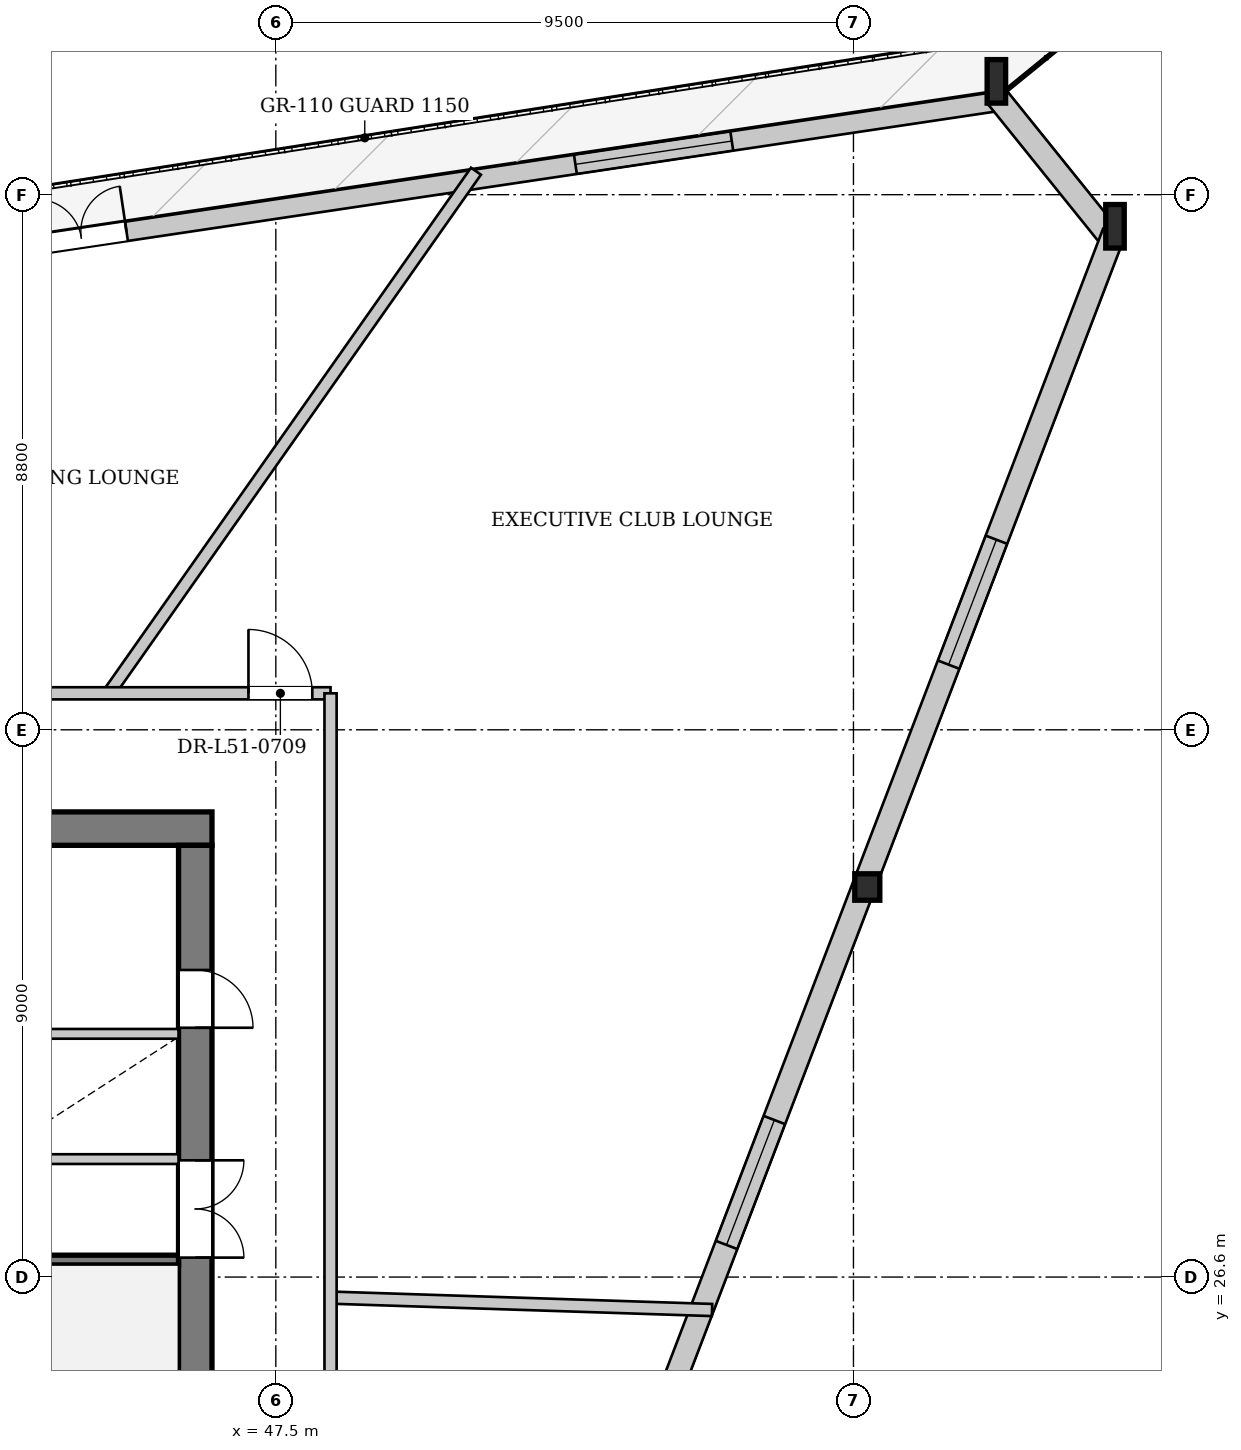
"""IFC4 building model, lengths in metres.
Left out: names, types, materials, properties, quantities, classifications, styles, units other than length and angle.
Written with IfcOpenShell. Run it as: python <this file> out.ifc"""

import sys

from ifc_helpers import new_model, si_unit, direction, frame, frame_2d, origin, origin_2d, place, context, subcontext, project, spatial, rectangle, i_section, extrude, source, transform, mapped, element, fill, save


model = new_model("IFC4")
c1 = context("Model", 3, precision=1e-05, world=origin(), true_north=direction((0.0, 1.0)))
c2 = subcontext(c1, "Body", "Model", "MODEL_VIEW")
j1 = project(units=[si_unit("LENGTHUNIT", "METRE"), si_unit("PLANEANGLEUNIT", "RADIAN")], contexts=[c1])
p1 = place(None, origin())
s1 = spatial("IfcSite", under=j1, at=p1, CompositionType="ELEMENT")
p2 = place(p1, origin())
s2 = spatial("IfcBuilding", under=s1, at=p2, CompositionType="ELEMENT")
p3 = place(p2, frame((0.0, 0.0, 192.75)))
s3 = spatial("IfcBuildingStorey", under=s2, at=p3, CompositionType="ELEMENT", Elevation=192.75)
m1 = source(origin(), c2, "Body", "SweptSolid", [
    extrude(i_section(OverallWidth=0.304, OverallDepth=0.716, WebThickness=0.021, FlangeThickness=0.04, at=origin_2d()), origin(), (0.0, 0.0, 1.0), 3.418),
])
p4 = place(p3, frame((61.46, 43.704, 0.0), z_axis=(-0.092925471989, 0.103067990838, 0.990324111551), x_axis=(-0.742705229141, -0.669618505275, 0.0)))
e1 = element("IfcColumn", 1, at=p4, inside=s3, PredefinedType="COLUMN", context=c2, shape_type="MappedRepresentation", body=[
    mapped(m1, transform((0.0, 0.0, 0.0), x_axis=(1.0, 0.0, 0.0), y_axis=(0.0, 1.0, 0.0), z_axis=(0.0, 0.0, 1.0), scale=1.0)),
])
m2 = source(origin(), c2, "Body", "SweptSolid", [
    extrude(i_section(OverallWidth=0.304, OverallDepth=0.716, WebThickness=0.021, FlangeThickness=0.04, at=origin_2d()), origin(), (0.0, 0.0, 1.0), 3.414),
])
p5 = place(p3, frame((59.516, 46.118, 0.0), z_axis=(-0.096907652623, 0.085607719697, 0.991604873521), x_axis=(-0.662060560161, -0.749450341703, 0.0)))
e2 = element("IfcColumn", 2, at=p5, inside=s3, PredefinedType="COLUMN", context=c2, shape_type="MappedRepresentation", body=[
    mapped(m2, transform((0.0, 0.0, 0.0), x_axis=(1.0, 0.0, 0.0), y_axis=(0.0, 1.0, 0.0), z_axis=(0.0, 0.0, 1.0), scale=1.0)),
])
m3 = source(origin(), c2, "Body", "SweptSolid", [
    extrude(i_section(OverallWidth=0.412, OverallDepth=0.435, WebThickness=0.031, FlangeThickness=0.05, at=origin_2d()), origin(), (0.0, 0.0, 1.0), 3.403),
])
p6 = place(p3, frame((57.309, 32.859, 0.0), z_axis=(-0.0480647848, 0.091394829605, 0.994654091423), x_axis=(-0.885068873791, -0.465460082763, 0.0)))
e3 = element("IfcColumn", 3, at=p6, inside=s3, PredefinedType="COLUMN", context=c2, shape_type="MappedRepresentation", body=[
    mapped(m3, transform((0.0, 0.0, 0.0), x_axis=(1.0, 0.0, 0.0), y_axis=(0.0, 1.0, 0.0), z_axis=(0.0, 0.0, 1.0), scale=1.0)),
])
p7 = place(p3, frame((37.131, 42.617, 0.0), z_axis=(0.0, 0.0, 1.0), x_axis=(0.989058686521, 0.147522590195, 0.0)))
e4 = element("IfcWall", 4, at=p7, inside=s3, PredefinedType="SOLIDWALL", context=c2, shape_type="SweptSolid", body=[
    extrude(rectangle(XDim=22.656, YDim=0.32, at=frame_2d((11.328, 0.0))), origin(), (0.0, 0.0, 1.0), 2.722),
])
p8 = place(p7, frame((6.5, 0.0, 0.0)))
e5 = element("IfcOpeningElement", 5, at=p8, cuts=e4, PredefinedType="OPENING", context=c2, shape_type="SweptSolid", body=[
    extrude(rectangle(XDim=1.5, YDim=2.3, at=frame_2d((0.75, 1.15))), frame((0.0, 0.17, 0.0), z_axis=(0.0, -1.0, 0.0), x_axis=(1.0, 0.0, 0.0)), (0.0, 0.0, 1.0), 0.34),
])
p9 = place(p7, frame((15.465, 0.0, 0.252)))
e6 = element("IfcOpeningElement", 6, at=p9, cuts=e4, PredefinedType="OPENING", context=c2, shape_type="SweptSolid", body=[
    extrude(rectangle(XDim=2.6, YDim=2.35, at=frame_2d((1.3, 1.175))), frame((0.0, 0.17, 0.0), z_axis=(0.0, -1.0, 0.0), x_axis=(1.0, 0.0, 0.0)), (0.0, 0.0, 1.0), 0.34),
])
p10 = place(p3, frame((59.368, 45.998, 0.0), z_axis=(0.0, 0.0, 1.0), x_axis=(0.627295033494, -0.778781703017, 0.0)))
e7 = element("IfcWall", 7, at=p10, inside=s3, PredefinedType="SOLIDWALL", context=c2, shape_type="SweptSolid", body=[
    extrude(rectangle(XDim=3.099, YDim=0.38, at=frame_2d((1.55, 0.0))), origin(), (0.0, 0.0, 1.0), 2.722),
])
p11 = place(p3, frame((61.283, 43.772, 0.0), z_axis=(0.0, 0.0, 1.0), x_axis=(-0.357452785868, -0.933931210462, 0.0)))
e8 = element("IfcWall", 8, at=p11, inside=s3, PredefinedType="SOLIDWALL", context=c2, shape_type="SweptSolid", body=[
    extrude(rectangle(XDim=23.224, YDim=0.38, at=frame_2d((11.612, 0.0))), origin(), (0.0, 0.0, 1.0), 2.722),
])
p12 = place(p11, frame((5.403, 0.0, 0.352)))
e9 = element("IfcOpeningElement", 9, at=p12, cuts=e8, PredefinedType="OPENING", context=c2, shape_type="SweptSolid", body=[
    extrude(rectangle(XDim=2.2, YDim=2.25, at=frame_2d((1.1, 1.125))), frame((0.0, 0.2, 0.0), z_axis=(0.0, -1.0, 0.0), x_axis=(1.0, 0.0, 0.0)), (0.0, 0.0, 1.0), 0.4),
])
p13 = place(p11, frame((15.621, 0.0, 0.352)))
e10 = element("IfcOpeningElement", 10, at=p13, cuts=e8, PredefinedType="OPENING", context=c2, shape_type="SweptSolid", body=[
    extrude(rectangle(XDim=2.2, YDim=2.25, at=frame_2d((1.1, 1.125))), frame((0.0, 0.2, 0.0), z_axis=(0.0, -1.0, 0.0), x_axis=(1.0, 0.0, 0.0)), (0.0, 0.0, 1.0), 0.4),
])
p14 = place(p3, frame((29.55, 33.975, 0.0), z_axis=(0.0, 0.0, 1.0), x_axis=(1.0, 0.0, 0.0)))
e11 = element("IfcWall", 11, at=p14, inside=s3, PredefinedType="SHEAR", context=c2, shape_type="SweptSolid", body=[
    extrude(rectangle(XDim=16.9, YDim=0.55, at=frame_2d((8.45, 0.0))), origin(), (0.0, 0.0, 1.0), 3.33),
])
p15 = place(p14, frame((1.55, 0.0, 0.0)))
e12 = element("IfcOpeningElement", 12, at=p15, cuts=e11, PredefinedType="OPENING", context=c2, shape_type="SweptSolid", body=[
    extrude(rectangle(XDim=0.95, YDim=2.1, at=frame_2d((0.475, 1.05))), frame((0.0, 0.285, 0.0), z_axis=(0.0, -1.0, 0.0), x_axis=(1.0, 0.0, 0.0)), (0.0, 0.0, 1.0), 0.57),
])
p16 = place(p14, frame((3.93, 0.0, 0.0)))
e13 = element("IfcOpeningElement", 13, at=p16, cuts=e11, PredefinedType="OPENING", context=c2, shape_type="SweptSolid", body=[
    extrude(rectangle(XDim=1.32, YDim=2.2, at=frame_2d((0.66, 1.1))), frame((0.0, 0.285, 0.0), z_axis=(0.0, -1.0, 0.0), x_axis=(1.0, 0.0, 0.0)), (0.0, 0.0, 1.0), 0.57),
])
p17 = place(p3, frame((46.175, 33.7, 0.0), z_axis=(0.0, 0.0, 1.0), x_axis=(0.0, -1.0, 0.0)))
e14 = element("IfcWall", 14, at=p17, inside=s3, PredefinedType="SHEAR", context=c2, shape_type="SweptSolid", body=[
    extrude(rectangle(XDim=14.2, YDim=0.55, at=frame_2d((7.1, 0.0))), origin(), (0.0, 0.0, 1.0), 3.33),
])
p18 = place(p17, frame((5.18, 0.0, 0.0)))
e15 = element("IfcOpeningElement", 15, at=p18, cuts=e14, PredefinedType="OPENING", context=c2, shape_type="SweptSolid", body=[
    extrude(rectangle(XDim=1.6, YDim=2.2, at=frame_2d((0.8, 1.1))), frame((0.0, 0.285, 0.0), z_axis=(0.0, -1.0, 0.0), x_axis=(1.0, 0.0, 0.0)), (0.0, 0.0, 1.0), 0.57),
])
p19 = place(p17, frame((2.05, 0.0, 0.0)))
e16 = element("IfcOpeningElement", 16, at=p19, cuts=e14, PredefinedType="OPENING", context=c2, shape_type="SweptSolid", body=[
    extrude(rectangle(XDim=0.95, YDim=2.1, at=frame_2d((0.475, 1.05))), frame((0.0, 0.285, 0.0), z_axis=(0.0, -1.0, 0.0), x_axis=(1.0, 0.0, 0.0)), (0.0, 0.0, 1.0), 0.57),
])
p20 = place(p3, frame((42.88, 26.88, 0.0), z_axis=(0.0, 0.0, 1.0), x_axis=(1.0, 0.0, 0.0)))
e17 = element("IfcWall", 17, at=p20, inside=s3, PredefinedType="PARTITIONING", context=c2, shape_type="SweptSolid", body=[
    extrude(rectangle(XDim=3.02, YDim=0.16, at=frame_2d((1.51, 0.0))), origin(), (0.0, 0.0, 1.0), 3.33),
])
p21 = place(p3, frame((33.28, 28.54, 0.0), z_axis=(0.0, 0.0, 1.0), x_axis=(1.0, 0.0, 0.0)))
e18 = element("IfcWall", 18, at=p21, inside=s3, PredefinedType="PARTITIONING", context=c2, shape_type="SweptSolid", body=[
    extrude(rectangle(XDim=12.62, YDim=0.16, at=frame_2d((6.31, 0.0))), origin(), (0.0, 0.0, 1.0), 3.33),
])
p22 = place(p21, frame((0.26, 0.0, 0.0)))
e19 = element("IfcOpeningElement", 19, at=p22, cuts=e18, PredefinedType="OPENING", context=c2, shape_type="SweptSolid", body=[
    extrude(rectangle(XDim=1.1, YDim=2.2, at=frame_2d((0.55, 1.1))), frame((0.0, 0.09, 0.0), z_axis=(0.0, -1.0, 0.0), x_axis=(1.0, 0.0, 0.0)), (0.0, 0.0, 1.0), 0.18),
])
p23 = place(p21, frame((2.01, 0.0, 0.0)))
e20 = element("IfcOpeningElement", 20, at=p23, cuts=e18, PredefinedType="OPENING", context=c2, shape_type="SweptSolid", body=[
    extrude(rectangle(XDim=1.1, YDim=2.2, at=frame_2d((0.55, 1.1))), frame((0.0, 0.09, 0.0), z_axis=(0.0, -1.0, 0.0), x_axis=(1.0, 0.0, 0.0)), (0.0, 0.0, 1.0), 0.18),
])
p24 = place(p21, frame((3.76, 0.0, 0.0)))
e21 = element("IfcOpeningElement", 21, at=p24, cuts=e18, PredefinedType="OPENING", context=c2, shape_type="SweptSolid", body=[
    extrude(rectangle(XDim=1.1, YDim=2.2, at=frame_2d((0.55, 1.1))), frame((0.0, 0.09, 0.0), z_axis=(0.0, -1.0, 0.0), x_axis=(1.0, 0.0, 0.0)), (0.0, 0.0, 1.0), 0.18),
])
p25 = place(p3, frame((40.72, 30.6, 0.0), z_axis=(0.0, 0.0, 1.0), x_axis=(1.0, 0.0, 0.0)))
e22 = element("IfcWall", 22, at=p25, inside=s3, PredefinedType="PARTITIONING", context=c2, shape_type="SweptSolid", body=[
    extrude(rectangle(XDim=5.18, YDim=0.16, at=frame_2d((2.59, 0.0))), origin(), (0.0, 0.0, 1.0), 3.33),
])
p26 = place(p3, frame((48.4, 26.262, 0.0), z_axis=(0.0, 0.0, 1.0), x_axis=(0.999472608607, -0.032473137284, 0.0)))
e23 = element("IfcWall", 23, at=p26, inside=s3, PredefinedType="PARTITIONING", context=c2, shape_type="SweptSolid", body=[
    extrude(rectangle(XDim=6.278, YDim=0.2, at=frame_2d((3.139, 0.0))), origin(), (0.0, 0.0, 1.0), 3.33),
])
p27 = place(p3, frame((44.752, 36.2, 0.0), z_axis=(0.0, 0.0, 1.0), x_axis=(0.5753136503, 0.817932884642, 0.0)))
e24 = element("IfcWall", 24, at=p27, inside=s3, PredefinedType="PARTITIONING", context=c2, shape_type="SweptSolid", body=[
    extrude(rectangle(XDim=10.497, YDim=0.2, at=frame_2d((5.249, 0.0))), origin(), (0.0, 0.0, 1.0), 3.33),
])
p28 = place(p3, frame((43.4, 36.2, 0.0), z_axis=(0.0, 0.0, 1.0), x_axis=(1.0, 0.0, 0.0)))
e25 = element("IfcWall", 25, at=p28, inside=s3, PredefinedType="PARTITIONING", context=c2, shape_type="SweptSolid", body=[
    extrude(rectangle(XDim=5.0, YDim=0.2, at=frame_2d((2.5, 0.0))), origin(), (0.0, 0.0, 1.0), 3.33),
])
p29 = place(p28, frame((3.65, 0.0, 0.0)))
e26 = element("IfcOpeningElement", 26, at=p29, cuts=e25, PredefinedType="OPENING", context=c2, shape_type="SweptSolid", body=[
    extrude(rectangle(XDim=1.05, YDim=2.2, at=frame_2d((0.525, 1.1))), frame((0.0, 0.11, 0.0), z_axis=(0.0, -1.0, 0.0), x_axis=(1.0, 0.0, 0.0)), (0.0, 0.0, 1.0), 0.22),
])
p30 = place(p3, frame((48.4, 17.0, 0.0), z_axis=(0.0, 0.0, 1.0), x_axis=(0.0, 1.0, 0.0)))
e27 = element("IfcWall", 27, at=p30, inside=s3, PredefinedType="PARTITIONING", context=c2, shape_type="SweptSolid", body=[
    extrude(rectangle(XDim=19.2, YDim=0.2, at=frame_2d((9.6, 0.0))), origin(), (0.0, 0.0, 1.0), 3.33),
])
m4 = source(origin(), c2, "Body", "SweptSolid", [
    extrude(rectangle(XDim=1.5, YDim=2.3, at=frame_2d((0.75, 1.15))), frame((0.0, 0.025, 0.0), z_axis=(0.0, -1.0, 0.0), x_axis=(1.0, 0.0, 0.0)), (0.0, 0.0, 1.0), 0.05),
])
p31 = place(p8, origin())
e28 = element("IfcDoor", 28, at=p31, inside=s3, OperationType="DOUBLE_DOOR_SINGLE_SWING", PredefinedType="DOOR", context=c2, shape_type="MappedRepresentation", body=[
    mapped(m4, transform((0.0, 0.0, 0.0), x_axis=(1.0, 0.0, 0.0), y_axis=(0.0, 1.0, 0.0), z_axis=(0.0, 0.0, 1.0), scale=1.0)),
])
fill(e5, e28)
m5 = source(origin(), c2, "Body", "SweptSolid", [
    extrude(rectangle(XDim=2.6, YDim=2.35, at=frame_2d((1.3, 1.175))), frame((0.0, 0.03, 0.0), z_axis=(0.0, -1.0, 0.0), x_axis=(1.0, 0.0, 0.0)), (0.0, 0.0, 1.0), 0.06),
])
p32 = place(p9, origin())
e29 = element("IfcWindow", 29, at=p32, inside=s3, PartitioningType="SINGLE_PANEL", PredefinedType="WINDOW", context=c2, shape_type="MappedRepresentation", body=[
    mapped(m5, transform((0.0, 0.0, 0.0), x_axis=(1.0, 0.0, 0.0), y_axis=(0.0, 1.0, 0.0), z_axis=(0.0, 0.0, 1.0), scale=1.0)),
])
fill(e6, e29)
m6 = source(origin(), c2, "Body", "SweptSolid", [
    extrude(rectangle(XDim=2.2, YDim=2.25, at=frame_2d((1.1, 1.125))), frame((0.0, 0.03, 0.0), z_axis=(0.0, -1.0, 0.0), x_axis=(1.0, 0.0, 0.0)), (0.0, 0.0, 1.0), 0.06),
])
p33 = place(p12, origin())
e30 = element("IfcWindow", 30, at=p33, inside=s3, PartitioningType="SINGLE_PANEL", PredefinedType="WINDOW", context=c2, shape_type="MappedRepresentation", body=[
    mapped(m6, transform((0.0, 0.0, 0.0), x_axis=(1.0, 0.0, 0.0), y_axis=(0.0, 1.0, 0.0), z_axis=(0.0, 0.0, 1.0), scale=1.0)),
])
fill(e9, e30)
p34 = place(p13, origin())
e31 = element("IfcWindow", 31, at=p34, inside=s3, PartitioningType="SINGLE_PANEL", PredefinedType="WINDOW", context=c2, shape_type="MappedRepresentation", body=[
    mapped(m6, transform((0.0, 0.0, 0.0), x_axis=(1.0, 0.0, 0.0), y_axis=(0.0, 1.0, 0.0), z_axis=(0.0, 0.0, 1.0), scale=1.0)),
])
fill(e10, e31)
m7 = source(origin(), c2, "Body", "SweptSolid", [
    extrude(rectangle(XDim=1.6, YDim=2.2, at=frame_2d((0.8, 1.1))), frame((0.0, 0.025, 0.0), z_axis=(0.0, -1.0, 0.0), x_axis=(1.0, 0.0, 0.0)), (0.0, 0.0, 1.0), 0.05),
])
p35 = place(p18, origin())
e32 = element("IfcDoor", 32, at=p35, inside=s3, OperationType="DOUBLE_DOOR_SINGLE_SWING", PredefinedType="DOOR", context=c2, shape_type="MappedRepresentation", body=[
    mapped(m7, transform((0.0, 0.0, 0.0), x_axis=(1.0, 0.0, 0.0), y_axis=(0.0, 1.0, 0.0), z_axis=(0.0, 0.0, 1.0), scale=1.0)),
])
fill(e15, e32)
m8 = source(origin(), c2, "Body", "SweptSolid", [
    extrude(rectangle(XDim=0.95, YDim=2.1, at=frame_2d((0.475, 1.05))), frame((0.0, 0.025, 0.0), z_axis=(0.0, -1.0, 0.0), x_axis=(1.0, 0.0, 0.0)), (0.0, 0.0, 1.0), 0.05),
])
p36 = place(p19, origin())
e33 = element("IfcDoor", 33, at=p36, inside=s3, OperationType="SINGLE_SWING_RIGHT", PredefinedType="DOOR", context=c2, shape_type="MappedRepresentation", body=[
    mapped(m8, transform((0.0, 0.0, 0.0), x_axis=(1.0, 0.0, 0.0), y_axis=(0.0, 1.0, 0.0), z_axis=(0.0, 0.0, 1.0), scale=1.0)),
])
fill(e16, e33)
m9 = source(origin(), c2, "Body", "SweptSolid", [
    extrude(rectangle(XDim=1.05, YDim=2.2, at=frame_2d((0.525, 1.1))), frame((0.0, 0.025, 0.0), z_axis=(0.0, -1.0, 0.0), x_axis=(1.0, 0.0, 0.0)), (0.0, 0.0, 1.0), 0.05),
])
p37 = place(p29, origin())
e34 = element("IfcDoor", 34, at=p37, inside=s3, OperationType="SINGLE_SWING_LEFT", PredefinedType="DOOR", context=c2, shape_type="MappedRepresentation", body=[
    mapped(m9, transform((0.0, 0.0, 0.0), x_axis=(1.0, 0.0, 0.0), y_axis=(0.0, 1.0, 0.0), z_axis=(0.0, 0.0, 1.0), scale=1.0)),
])
fill(e26, e34)
save(model, sys.argv[1])
